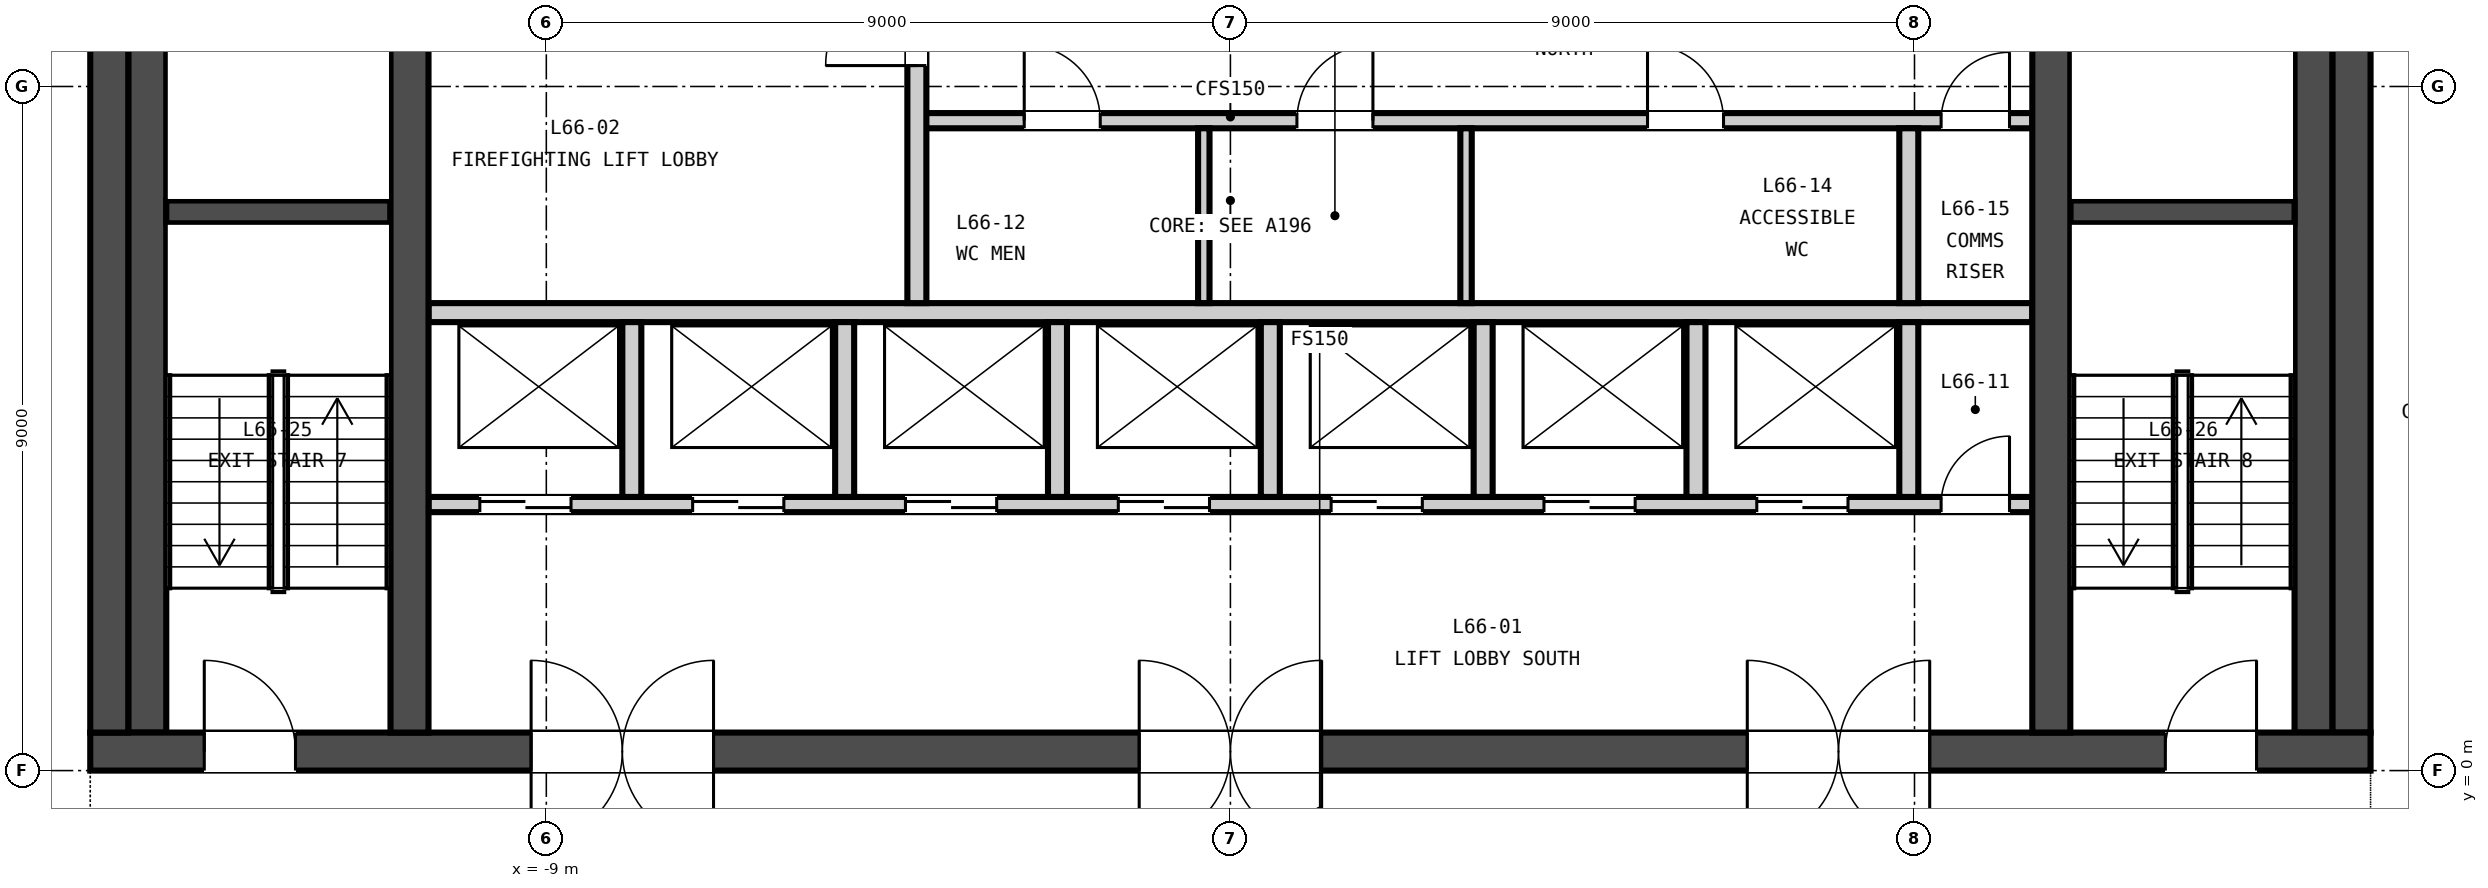
"""IFC4 building model, lengths in metres.
Left out: names, types, materials, properties, quantities, classifications, styles, units other than length and angle.
Written with IfcOpenShell. Run it as: python <this file> out.ifc"""

import sys

from ifc_helpers import new_model, si_unit, direction, frame, frame_2d, origin, place, context, subcontext, project, spatial, rectangle, extrude, element, fill, save


model = new_model("IFC4")
c1 = context("Model", 3, precision=1e-05, world=origin(), true_north=direction((0.0, 1.0)))
c2 = subcontext(c1, "Body", "Model", "MODEL_VIEW")
j1 = project(units=[si_unit("LENGTHUNIT", "METRE"), si_unit("PLANEANGLEUNIT", "RADIAN")], contexts=[c1])
p1 = place(None, origin())
s1 = spatial("IfcSite", under=j1, at=p1, CompositionType="ELEMENT")
p2 = place(p1, origin())
s2 = spatial("IfcBuilding", under=s1, at=p2, CompositionType="ELEMENT")
p3 = place(p2, frame((0.0, 0.0, 260.95)))
s3 = spatial("IfcBuildingStorey", under=s2, at=p3, CompositionType="ELEMENT", Elevation=260.95)
p4 = place(p3, frame((-15.0, 0.25, -0.15), z_axis=(0.0, 0.0, 1.0), x_axis=(1.0, 0.0, 0.0)))
e1 = element("IfcWall", 1, at=p4, inside=s3, PredefinedType="SOLIDWALL", context=c2, shape_type="SweptSolid", body=[
    extrude(rectangle(XDim=30.0, YDim=0.5, at=frame_2d((15.0, 0.0))), origin(), (0.0, 0.0, 1.0), 3.65),
])
p5 = place(p4, frame((5.8, 0.0, 0.15)))
e2 = element("IfcOpeningElement", 2, at=p5, cuts=e1, PredefinedType="OPENING", context=c2, shape_type="SweptSolid", body=[
    extrude(rectangle(XDim=2.4, YDim=2.4, at=frame_2d((1.2, 1.2))), frame((0.0, 0.26, 0.0), z_axis=(0.0, -1.0, 0.0), x_axis=(1.0, 0.0, 0.0)), (0.0, 0.0, 1.0), 0.52),
])
p6 = place(p4, frame((13.8, 0.0, 0.15)))
e3 = element("IfcOpeningElement", 3, at=p6, cuts=e1, PredefinedType="OPENING", context=c2, shape_type="SweptSolid", body=[
    extrude(rectangle(XDim=2.4, YDim=2.4, at=frame_2d((1.2, 1.2))), frame((0.0, 0.26, 0.0), z_axis=(0.0, -1.0, 0.0), x_axis=(1.0, 0.0, 0.0)), (0.0, 0.0, 1.0), 0.52),
])
p7 = place(p4, frame((21.8, 0.0, 0.15)))
e4 = element("IfcOpeningElement", 4, at=p7, cuts=e1, PredefinedType="OPENING", context=c2, shape_type="SweptSolid", body=[
    extrude(rectangle(XDim=2.4, YDim=2.4, at=frame_2d((1.2, 1.2))), frame((0.0, 0.26, 0.0), z_axis=(0.0, -1.0, 0.0), x_axis=(1.0, 0.0, 0.0)), (0.0, 0.0, 1.0), 0.52),
])
p8 = place(p4, frame((1.5, 0.0, 0.15)))
e5 = element("IfcOpeningElement", 5, at=p8, cuts=e1, PredefinedType="OPENING", context=c2, shape_type="SweptSolid", body=[
    extrude(rectangle(XDim=1.2, YDim=2.1, at=frame_2d((0.6, 1.05))), frame((0.0, 0.26, 0.0), z_axis=(0.0, -1.0, 0.0), x_axis=(1.0, 0.0, 0.0)), (0.0, 0.0, 1.0), 0.52),
])
p9 = place(p4, frame((27.3, 0.0, 0.15)))
e6 = element("IfcOpeningElement", 6, at=p9, cuts=e1, PredefinedType="OPENING", context=c2, shape_type="SweptSolid", body=[
    extrude(rectangle(XDim=1.2, YDim=2.1, at=frame_2d((0.6, 1.05))), frame((0.0, 0.26, 0.0), z_axis=(0.0, -1.0, 0.0), x_axis=(1.0, 0.0, 0.0)), (0.0, 0.0, 1.0), 0.52),
])
for number, where, z_axis, x_axis in (
    (7, (-14.75, 0.5, -0.15), (0.0, 0.0, 1.0), (0.0, 1.0, 0.0)),
    (8, (14.75, 0.5, -0.15), (0.0, 0.0, 1.0), (0.0, 1.0, 0.0)),
    (9, (-10.8, 0.5, -0.15), (0.0, 0.0, 1.0), (0.0, 1.0, 0.0)),
    (10, (10.8, 0.5, -0.15), (0.0, 0.0, 1.0), (0.0, 1.0, 0.0)),
):
    element("IfcWall", number, at=place(p3, frame(where, z_axis=z_axis, x_axis=x_axis)), inside=s3, PredefinedType="SOLIDWALL", context=c2, shape_type="SweptSolid", body=[
        extrude(rectangle(XDim=14.0, YDim=0.5, at=frame_2d((7.0, 0.0))), origin(), (0.0, 0.0, 1.0), 3.65),
    ])
p10 = place(p3, frame((-10.55, 3.5, 0.0), z_axis=(0.0, 0.0, 1.0), x_axis=(1.0, 0.0, 0.0)))
e11 = element("IfcWall", 11, at=p10, inside=s3, PredefinedType="PARTITIONING", context=c2, shape_type="SweptSolid", body=[
    extrude(rectangle(XDim=21.1, YDim=0.2, at=frame_2d((10.55, 0.0))), origin(), (0.0, 0.0, 1.0), 3.5),
])
p11 = place(p10, frame((0.675, 0.0, 0.0)))
e12 = element("IfcOpeningElement", 12, at=p11, cuts=e11, PredefinedType="OPENING", context=c2, shape_type="SweptSolid", body=[
    extrude(rectangle(XDim=1.2, YDim=2.1, at=frame_2d((0.6, 1.05))), frame((0.0, 0.11, 0.0), z_axis=(0.0, -1.0, 0.0), x_axis=(1.0, 0.0, 0.0)), (0.0, 0.0, 1.0), 0.22),
])
p12 = place(p10, frame((3.475, 0.0, 0.0)))
e13 = element("IfcOpeningElement", 13, at=p12, cuts=e11, PredefinedType="OPENING", context=c2, shape_type="SweptSolid", body=[
    extrude(rectangle(XDim=1.2, YDim=2.1, at=frame_2d((0.6, 1.05))), frame((0.0, 0.11, 0.0), z_axis=(0.0, -1.0, 0.0), x_axis=(1.0, 0.0, 0.0)), (0.0, 0.0, 1.0), 0.22),
])
p13 = place(p10, frame((6.275, 0.0, 0.0)))
e14 = element("IfcOpeningElement", 14, at=p13, cuts=e11, PredefinedType="OPENING", context=c2, shape_type="SweptSolid", body=[
    extrude(rectangle(XDim=1.2, YDim=2.1, at=frame_2d((0.6, 1.05))), frame((0.0, 0.11, 0.0), z_axis=(0.0, -1.0, 0.0), x_axis=(1.0, 0.0, 0.0)), (0.0, 0.0, 1.0), 0.22),
])
p14 = place(p10, frame((9.075, 0.0, 0.0)))
e15 = element("IfcOpeningElement", 15, at=p14, cuts=e11, PredefinedType="OPENING", context=c2, shape_type="SweptSolid", body=[
    extrude(rectangle(XDim=1.2, YDim=2.1, at=frame_2d((0.6, 1.05))), frame((0.0, 0.11, 0.0), z_axis=(0.0, -1.0, 0.0), x_axis=(1.0, 0.0, 0.0)), (0.0, 0.0, 1.0), 0.22),
])
p15 = place(p10, frame((11.875, 0.0, 0.0)))
e16 = element("IfcOpeningElement", 16, at=p15, cuts=e11, PredefinedType="OPENING", context=c2, shape_type="SweptSolid", body=[
    extrude(rectangle(XDim=1.2, YDim=2.1, at=frame_2d((0.6, 1.05))), frame((0.0, 0.11, 0.0), z_axis=(0.0, -1.0, 0.0), x_axis=(1.0, 0.0, 0.0)), (0.0, 0.0, 1.0), 0.22),
])
p16 = place(p10, frame((14.675, 0.0, 0.0)))
e17 = element("IfcOpeningElement", 17, at=p16, cuts=e11, PredefinedType="OPENING", context=c2, shape_type="SweptSolid", body=[
    extrude(rectangle(XDim=1.2, YDim=2.1, at=frame_2d((0.6, 1.05))), frame((0.0, 0.11, 0.0), z_axis=(0.0, -1.0, 0.0), x_axis=(1.0, 0.0, 0.0)), (0.0, 0.0, 1.0), 0.22),
])
p17 = place(p10, frame((17.475, 0.0, 0.0)))
e18 = element("IfcOpeningElement", 18, at=p17, cuts=e11, PredefinedType="OPENING", context=c2, shape_type="SweptSolid", body=[
    extrude(rectangle(XDim=1.2, YDim=2.1, at=frame_2d((0.6, 1.05))), frame((0.0, 0.11, 0.0), z_axis=(0.0, -1.0, 0.0), x_axis=(1.0, 0.0, 0.0)), (0.0, 0.0, 1.0), 0.22),
])
p18 = place(p10, frame((19.9, 0.0, 0.0)))
e19 = element("IfcOpeningElement", 19, at=p18, cuts=e11, PredefinedType="OPENING", context=c2, shape_type="SweptSolid", body=[
    extrude(rectangle(XDim=0.9, YDim=2.1, at=frame_2d((0.45, 1.05))), frame((0.0, 0.11, 0.0), z_axis=(0.0, -1.0, 0.0), x_axis=(1.0, 0.0, 0.0)), (0.0, 0.0, 1.0), 0.22),
])
p19 = place(p3, frame((-10.55, 6.025, 0.0), z_axis=(0.0, 0.0, 1.0), x_axis=(1.0, 0.0, 0.0)))
e20 = element("IfcWall", 20, at=p19, inside=s3, PredefinedType="PARTITIONING", context=c2, shape_type="SweptSolid", body=[
    extrude(rectangle(XDim=21.1, YDim=0.25, at=frame_2d((10.55, 0.0))), origin(), (0.0, 0.0, 1.0), 3.5),
])
p20 = place(p3, frame((-4.125, 8.55, 0.0), z_axis=(0.0, 0.0, 1.0), x_axis=(1.0, 0.0, 0.0)))
e21 = element("IfcWall", 21, at=p20, inside=s3, PredefinedType="PARTITIONING", context=c2, shape_type="SweptSolid", body=[
    extrude(rectangle(XDim=14.675, YDim=0.2, at=frame_2d((7.337, 0.0))), origin(), (0.0, 0.0, 1.0), 3.5),
])
p21 = place(p20, frame((1.413, 0.0, 0.0)))
e22 = element("IfcOpeningElement", 22, at=p21, cuts=e21, PredefinedType="OPENING", context=c2, shape_type="SweptSolid", body=[
    extrude(rectangle(XDim=1.0, YDim=2.1, at=frame_2d((0.5, 1.05))), frame((0.0, 0.11, 0.0), z_axis=(0.0, -1.0, 0.0), x_axis=(1.0, 0.0, 0.0)), (0.0, 0.0, 1.0), 0.22),
])
p22 = place(p20, frame((5.0, 0.0, 0.0)))
e23 = element("IfcOpeningElement", 23, at=p22, cuts=e21, PredefinedType="OPENING", context=c2, shape_type="SweptSolid", body=[
    extrude(rectangle(XDim=1.0, YDim=2.1, at=frame_2d((0.5, 1.05))), frame((0.0, 0.11, 0.0), z_axis=(0.0, -1.0, 0.0), x_axis=(1.0, 0.0, 0.0)), (0.0, 0.0, 1.0), 0.22),
])
p23 = place(p20, frame((9.613, 0.0, 0.0)))
e24 = element("IfcOpeningElement", 24, at=p23, cuts=e21, PredefinedType="OPENING", context=c2, shape_type="SweptSolid", body=[
    extrude(rectangle(XDim=1.0, YDim=2.1, at=frame_2d((0.5, 1.05))), frame((0.0, 0.11, 0.0), z_axis=(0.0, -1.0, 0.0), x_axis=(1.0, 0.0, 0.0)), (0.0, 0.0, 1.0), 0.22),
])
p24 = place(p20, frame((13.475, 0.0, 0.0)))
e25 = element("IfcOpeningElement", 25, at=p24, cuts=e21, PredefinedType="OPENING", context=c2, shape_type="SweptSolid", body=[
    extrude(rectangle(XDim=0.9, YDim=2.1, at=frame_2d((0.45, 1.05))), frame((0.0, 0.11, 0.0), z_axis=(0.0, -1.0, 0.0), x_axis=(1.0, 0.0, 0.0)), (0.0, 0.0, 1.0), 0.22),
])
p25 = place(p3, frame((-4.125, 6.15, 0.0), z_axis=(0.0, 0.0, 1.0), x_axis=(0.0, 1.0, 0.0)))
e26 = element("IfcWall", 26, at=p25, inside=s3, PredefinedType="PARTITIONING", context=c2, shape_type="SweptSolid", body=[
    extrude(rectangle(XDim=4.95, YDim=0.25, at=frame_2d((2.475, 0.0))), origin(), (0.0, 0.0, 1.0), 3.5),
])
p26 = place(p25, frame((3.125, 0.0, 0.0)))
e27 = element("IfcOpeningElement", 27, at=p26, cuts=e26, PredefinedType="OPENING", context=c2, shape_type="SweptSolid", body=[
    extrude(rectangle(XDim=1.2, YDim=2.1, at=frame_2d((0.6, 1.05))), frame((0.0, 0.135, 0.0), z_axis=(0.0, -1.0, 0.0), x_axis=(1.0, 0.0, 0.0)), (0.0, 0.0, 1.0), 0.27),
])
for number, where, z_axis, x_axis in (
    (28, (-7.875, 3.6, 0.0), (0.0, 0.0, 1.0), (0.0, 1.0, 0.0)),
    (29, (-5.075, 3.6, 0.0), (0.0, 0.0, 1.0), (0.0, 1.0, 0.0)),
    (30, (-2.275, 3.6, 0.0), (0.0, 0.0, 1.0), (0.0, 1.0, 0.0)),
    (31, (0.525, 3.6, 0.0), (0.0, 0.0, 1.0), (0.0, 1.0, 0.0)),
    (32, (3.325, 3.6, 0.0), (0.0, 0.0, 1.0), (0.0, 1.0, 0.0)),
    (33, (6.125, 3.6, 0.0), (0.0, 0.0, 1.0), (0.0, 1.0, 0.0)),
    (34, (8.925, 3.6, 0.0), (0.0, 0.0, 1.0), (0.0, 1.0, 0.0)),
):
    element("IfcWall", number, at=place(p3, frame(where, z_axis=z_axis, x_axis=x_axis)), inside=s3, PredefinedType="PARTITIONING", context=c2, shape_type="SweptSolid", body=[
        extrude(rectangle(XDim=2.3, YDim=0.25, at=frame_2d((1.15, 0.0))), origin(), (0.0, 0.0, 1.0), 3.5),
    ])
for number, where, z_axis, x_axis in (
    (35, (-0.35, 6.15, 0.0), (0.0, 0.0, 1.0), (0.0, 1.0, 0.0)),
    (36, (3.1, 6.15, 0.0), (0.0, 0.0, 1.0), (0.0, 1.0, 0.0)),
):
    element("IfcWall", number, at=place(p3, frame(where, z_axis=z_axis, x_axis=x_axis)), inside=s3, PredefinedType="PARTITIONING", context=c2, shape_type="SweptSolid", body=[
        extrude(rectangle(XDim=2.3, YDim=0.15, at=frame_2d((1.15, 0.0))), origin(), (0.0, 0.0, 1.0), 3.5),
    ])
p27 = place(p3, frame((8.925, 6.15, 0.0), z_axis=(0.0, 0.0, 1.0), x_axis=(0.0, 1.0, 0.0)))
e37 = element("IfcWall", 37, at=p27, inside=s3, PredefinedType="PARTITIONING", context=c2, shape_type="SweptSolid", body=[
    extrude(rectangle(XDim=2.3, YDim=0.25, at=frame_2d((1.15, 0.0))), origin(), (0.0, 0.0, 1.0), 3.5),
])
p28 = place(p3, frame((-14.0, 7.35, 0.0), z_axis=(0.0, 0.0, 1.0), x_axis=(1.0, 0.0, 0.0)))
e38 = element("IfcWall", 38, at=p28, inside=s3, PredefinedType="SOLIDWALL", context=c2, shape_type="SweptSolid", body=[
    extrude(rectangle(XDim=2.95, YDim=0.3, at=frame_2d((1.475, 0.0))), origin(), (0.0, 0.0, 1.0), 3.5),
])
p29 = place(p3, frame((-14.25, 0.5, 0.0), z_axis=(0.0, 0.0, 1.0), x_axis=(0.0, 1.0, 0.0)))
e39 = element("IfcWall", 39, at=p29, inside=s3, PredefinedType="SOLIDWALL", context=c2, shape_type="SweptSolid", body=[
    extrude(rectangle(XDim=14.0, YDim=0.5, at=frame_2d((7.0, 0.0))), origin(), (0.0, 0.0, 1.0), 3.5),
])
p30 = place(p3, frame((11.05, 7.35, 0.0), z_axis=(0.0, 0.0, 1.0), x_axis=(1.0, 0.0, 0.0)))
e40 = element("IfcWall", 40, at=p30, inside=s3, PredefinedType="SOLIDWALL", context=c2, shape_type="SweptSolid", body=[
    extrude(rectangle(XDim=2.95, YDim=0.3, at=frame_2d((1.475, 0.0))), origin(), (0.0, 0.0, 1.0), 3.5),
])
p31 = place(p3, frame((14.25, 0.5, 0.0), z_axis=(0.0, 0.0, 1.0), x_axis=(0.0, 1.0, 0.0)))
e41 = element("IfcWall", 41, at=p31, inside=s3, PredefinedType="SOLIDWALL", context=c2, shape_type="SweptSolid", body=[
    extrude(rectangle(XDim=14.0, YDim=0.5, at=frame_2d((7.0, 0.0))), origin(), (0.0, 0.0, 1.0), 3.5),
])
p32 = place(p26, origin())
e42 = element("IfcDoor", 42, at=p32, inside=s3, OperationType="SINGLE_SWING_LEFT", PredefinedType="DOOR", context=c2, shape_type="SweptSolid", body=[
    extrude(rectangle(XDim=1.2, YDim=2.1, at=frame_2d((0.6, 1.05))), frame((0.0, 0.025, 0.0), z_axis=(0.0, -1.0, 0.0), x_axis=(1.0, 0.0, 0.0)), (0.0, 0.0, 1.0), 0.05),
])
fill(e27, e42)
p33 = place(p11, origin())
e43 = element("IfcDoor", 43, at=p33, inside=s3, OperationType="DOUBLE_DOOR_SLIDING", PredefinedType="DOOR", context=c2, shape_type="SweptSolid", body=[
    extrude(rectangle(XDim=1.2, YDim=2.1, at=frame_2d((0.6, 1.05))), frame((0.0, 0.025, 0.0), z_axis=(0.0, -1.0, 0.0), x_axis=(1.0, 0.0, 0.0)), (0.0, 0.0, 1.0), 0.05),
])
fill(e12, e43)
p34 = place(p12, origin())
e44 = element("IfcDoor", 44, at=p34, inside=s3, OperationType="DOUBLE_DOOR_SLIDING", PredefinedType="DOOR", context=c2, shape_type="SweptSolid", body=[
    extrude(rectangle(XDim=1.2, YDim=2.1, at=frame_2d((0.6, 1.05))), frame((0.0, 0.025, 0.0), z_axis=(0.0, -1.0, 0.0), x_axis=(1.0, 0.0, 0.0)), (0.0, 0.0, 1.0), 0.05),
])
fill(e13, e44)
p35 = place(p13, origin())
e45 = element("IfcDoor", 45, at=p35, inside=s3, OperationType="DOUBLE_DOOR_SLIDING", PredefinedType="DOOR", context=c2, shape_type="SweptSolid", body=[
    extrude(rectangle(XDim=1.2, YDim=2.1, at=frame_2d((0.6, 1.05))), frame((0.0, 0.025, 0.0), z_axis=(0.0, -1.0, 0.0), x_axis=(1.0, 0.0, 0.0)), (0.0, 0.0, 1.0), 0.05),
])
fill(e14, e45)
p36 = place(p14, origin())
e46 = element("IfcDoor", 46, at=p36, inside=s3, OperationType="DOUBLE_DOOR_SLIDING", PredefinedType="DOOR", context=c2, shape_type="SweptSolid", body=[
    extrude(rectangle(XDim=1.2, YDim=2.1, at=frame_2d((0.6, 1.05))), frame((0.0, 0.025, 0.0), z_axis=(0.0, -1.0, 0.0), x_axis=(1.0, 0.0, 0.0)), (0.0, 0.0, 1.0), 0.05),
])
fill(e15, e46)
p37 = place(p15, origin())
e47 = element("IfcDoor", 47, at=p37, inside=s3, OperationType="DOUBLE_DOOR_SLIDING", PredefinedType="DOOR", context=c2, shape_type="SweptSolid", body=[
    extrude(rectangle(XDim=1.2, YDim=2.1, at=frame_2d((0.6, 1.05))), frame((0.0, 0.025, 0.0), z_axis=(0.0, -1.0, 0.0), x_axis=(1.0, 0.0, 0.0)), (0.0, 0.0, 1.0), 0.05),
])
fill(e16, e47)
p38 = place(p16, origin())
e48 = element("IfcDoor", 48, at=p38, inside=s3, OperationType="DOUBLE_DOOR_SLIDING", PredefinedType="DOOR", context=c2, shape_type="SweptSolid", body=[
    extrude(rectangle(XDim=1.2, YDim=2.1, at=frame_2d((0.6, 1.05))), frame((0.0, 0.025, 0.0), z_axis=(0.0, -1.0, 0.0), x_axis=(1.0, 0.0, 0.0)), (0.0, 0.0, 1.0), 0.05),
])
fill(e17, e48)
p39 = place(p17, origin())
e49 = element("IfcDoor", 49, at=p39, inside=s3, OperationType="DOUBLE_DOOR_SLIDING", PredefinedType="DOOR", context=c2, shape_type="SweptSolid", body=[
    extrude(rectangle(XDim=1.2, YDim=2.1, at=frame_2d((0.6, 1.05))), frame((0.0, 0.025, 0.0), z_axis=(0.0, -1.0, 0.0), x_axis=(1.0, 0.0, 0.0)), (0.0, 0.0, 1.0), 0.05),
])
fill(e18, e49)
p40 = place(p18, origin())
e50 = element("IfcDoor", 50, at=p40, inside=s3, OperationType="SINGLE_SWING_RIGHT", PredefinedType="DOOR", context=c2, shape_type="SweptSolid", body=[
    extrude(rectangle(XDim=0.9, YDim=2.1, at=frame_2d((0.45, 1.05))), frame((0.0, 0.025, 0.0), z_axis=(0.0, -1.0, 0.0), x_axis=(1.0, 0.0, 0.0)), (0.0, 0.0, 1.0), 0.05),
])
fill(e19, e50)
p41 = place(p21, origin())
e51 = element("IfcDoor", 51, at=p41, inside=s3, OperationType="SINGLE_SWING_LEFT", PredefinedType="DOOR", context=c2, shape_type="SweptSolid", body=[
    extrude(rectangle(XDim=1.0, YDim=2.1, at=frame_2d((0.5, 1.05))), frame((0.0, 0.025, 0.0), z_axis=(0.0, -1.0, 0.0), x_axis=(1.0, 0.0, 0.0)), (0.0, 0.0, 1.0), 0.05),
])
fill(e22, e51)
p42 = place(p22, origin())
e52 = element("IfcDoor", 52, at=p42, inside=s3, OperationType="SINGLE_SWING_RIGHT", PredefinedType="DOOR", context=c2, shape_type="SweptSolid", body=[
    extrude(rectangle(XDim=1.0, YDim=2.1, at=frame_2d((0.5, 1.05))), frame((0.0, 0.025, 0.0), z_axis=(0.0, -1.0, 0.0), x_axis=(1.0, 0.0, 0.0)), (0.0, 0.0, 1.0), 0.05),
])
fill(e23, e52)
p43 = place(p23, origin())
e53 = element("IfcDoor", 53, at=p43, inside=s3, OperationType="SINGLE_SWING_LEFT", PredefinedType="DOOR", context=c2, shape_type="SweptSolid", body=[
    extrude(rectangle(XDim=1.0, YDim=2.1, at=frame_2d((0.5, 1.05))), frame((0.0, 0.025, 0.0), z_axis=(0.0, -1.0, 0.0), x_axis=(1.0, 0.0, 0.0)), (0.0, 0.0, 1.0), 0.05),
])
fill(e24, e53)
p44 = place(p24, origin())
e54 = element("IfcDoor", 54, at=p44, inside=s3, OperationType="SINGLE_SWING_RIGHT", PredefinedType="DOOR", context=c2, shape_type="SweptSolid", body=[
    extrude(rectangle(XDim=0.9, YDim=2.1, at=frame_2d((0.45, 1.05))), frame((0.0, 0.025, 0.0), z_axis=(0.0, -1.0, 0.0), x_axis=(1.0, 0.0, 0.0)), (0.0, 0.0, 1.0), 0.05),
])
fill(e25, e54)
p45 = place(p5, origin())
e55 = element("IfcDoor", 55, at=p45, inside=s3, OperationType="DOUBLE_DOOR_DOUBLE_SWING", PredefinedType="DOOR", context=c2, shape_type="SweptSolid", body=[
    extrude(rectangle(XDim=2.4, YDim=2.4, at=frame_2d((1.2, 1.2))), frame((0.0, 0.025, 0.0), z_axis=(0.0, -1.0, 0.0), x_axis=(1.0, 0.0, 0.0)), (0.0, 0.0, 1.0), 0.05),
])
fill(e2, e55)
p46 = place(p6, origin())
e56 = element("IfcDoor", 56, at=p46, inside=s3, OperationType="DOUBLE_DOOR_DOUBLE_SWING", PredefinedType="DOOR", context=c2, shape_type="SweptSolid", body=[
    extrude(rectangle(XDim=2.4, YDim=2.4, at=frame_2d((1.2, 1.2))), frame((0.0, 0.025, 0.0), z_axis=(0.0, -1.0, 0.0), x_axis=(1.0, 0.0, 0.0)), (0.0, 0.0, 1.0), 0.05),
])
fill(e3, e56)
p47 = place(p7, origin())
e57 = element("IfcDoor", 57, at=p47, inside=s3, OperationType="DOUBLE_DOOR_DOUBLE_SWING", PredefinedType="DOOR", context=c2, shape_type="SweptSolid", body=[
    extrude(rectangle(XDim=2.4, YDim=2.4, at=frame_2d((1.2, 1.2))), frame((0.0, 0.025, 0.0), z_axis=(0.0, -1.0, 0.0), x_axis=(1.0, 0.0, 0.0)), (0.0, 0.0, 1.0), 0.05),
])
fill(e4, e57)
p48 = place(p8, origin())
e58 = element("IfcDoor", 58, at=p48, inside=s3, OperationType="SINGLE_SWING_LEFT", PredefinedType="DOOR", context=c2, shape_type="SweptSolid", body=[
    extrude(rectangle(XDim=1.2, YDim=2.1, at=frame_2d((0.6, 1.05))), frame((0.0, 0.025, 0.0), z_axis=(0.0, -1.0, 0.0), x_axis=(1.0, 0.0, 0.0)), (0.0, 0.0, 1.0), 0.05),
])
fill(e5, e58)
p49 = place(p9, origin())
e59 = element("IfcDoor", 59, at=p49, inside=s3, OperationType="SINGLE_SWING_RIGHT", PredefinedType="DOOR", context=c2, shape_type="SweptSolid", body=[
    extrude(rectangle(XDim=1.2, YDim=2.1, at=frame_2d((0.6, 1.05))), frame((0.0, 0.025, 0.0), z_axis=(0.0, -1.0, 0.0), x_axis=(1.0, 0.0, 0.0)), (0.0, 0.0, 1.0), 0.05),
])
fill(e6, e59)
save(model, sys.argv[1])
